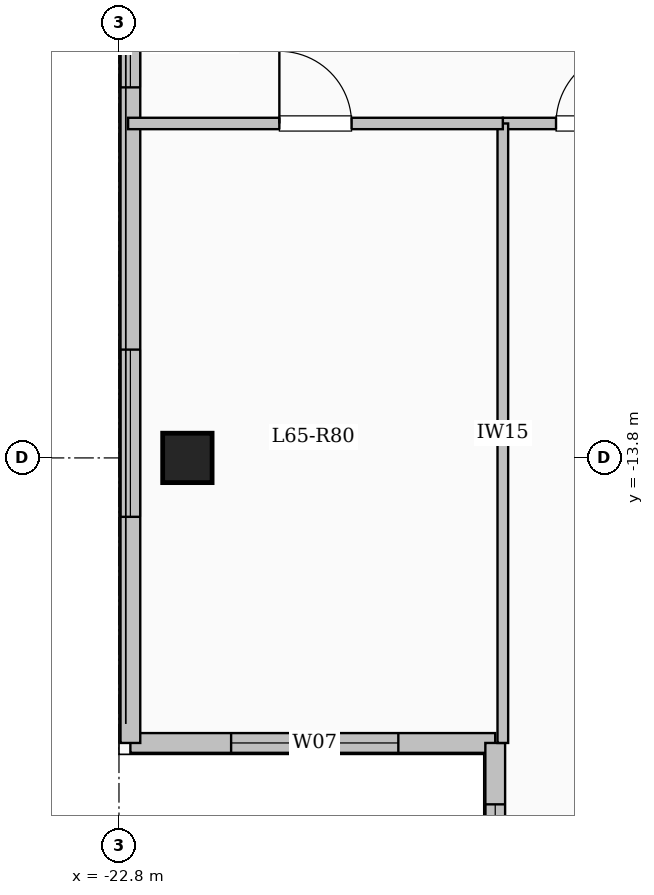
"""IFC4 building model, lengths in metres.
Left out: names, types, materials, properties, quantities, classifications, styles, units other than length and angle.
Written with IfcOpenShell. Run it as: python <this file> out.ifc"""

import sys

from ifc_helpers import new_model, si_unit, direction, frame, frame_2d, origin, origin_2d, place, context, subcontext, project, spatial, rectangle, extrude, element, fill, save


model = new_model("IFC4")
c1 = context("Model", 3, precision=1e-05, world=origin(), true_north=direction((0.0, 1.0)))
c2 = subcontext(c1, "Body", "Model", "MODEL_VIEW")
j1 = project(units=[si_unit("LENGTHUNIT", "METRE"), si_unit("PLANEANGLEUNIT", "RADIAN")], contexts=[c1])
p1 = place(None, origin())
s1 = spatial("IfcSite", under=j1, at=p1, CompositionType="ELEMENT")
p2 = place(p1, origin())
s2 = spatial("IfcBuilding", under=s1, at=p2, CompositionType="ELEMENT")
p3 = place(p2, frame((0.0, 0.0, 241.5)))
s3 = spatial("IfcBuildingStorey", under=s2, at=p3, CompositionType="ELEMENT", Elevation=241.5)
p4 = place(p3, frame((-21.9, -13.8, 0.0), z_axis=(0.0, 0.0, 1.0), x_axis=(1.0, 0.0, 0.0)))
e1 = element("IfcColumn", 1, at=p4, inside=s3, PredefinedType="COLUMN", context=c2, shape_type="SweptSolid", body=[
    extrude(rectangle(XDim=0.65, YDim=0.65, at=origin_2d()), origin(), (0.0, 0.0, 1.0), 3.35),
])
p5 = place(p3, frame((-17.85, -17.55, 0.0), z_axis=(0.0, 0.0, 1.0), x_axis=(-1.0, 0.0, 0.0)))
e2 = element("IfcWall", 2, at=p5, inside=s3, PredefinedType="SOLIDWALL", context=c2, shape_type="SweptSolid", body=[
    extrude(rectangle(XDim=4.8, YDim=0.26, at=frame_2d((2.4, 0.0))), origin(), (0.0, 0.0, 1.0), 3.1),
])
p6 = place(p5, frame((1.275, 0.0, 0.9)))
e3 = element("IfcOpeningElement", 3, at=p6, cuts=e2, PredefinedType="OPENING", context=c2, shape_type="SweptSolid", body=[
    extrude(rectangle(XDim=2.2, YDim=1.75, at=frame_2d((1.1, 0.875))), frame((0.0, 0.14, 0.0), z_axis=(0.0, -1.0, 0.0), x_axis=(1.0, 0.0, 0.0)), (0.0, 0.0, 1.0), 0.28),
])
p7 = place(p3, frame((-22.65, -17.55, 0.0), z_axis=(0.0, 0.0, 1.0), x_axis=(0.0, 1.0, 0.0)))
e4 = element("IfcWall", 4, at=p7, inside=s3, PredefinedType="SOLIDWALL", context=c2, shape_type="SweptSolid", body=[
    extrude(rectangle(XDim=35.1, YDim=0.26, at=frame_2d((17.55, 0.0))), origin(), (0.0, 0.0, 1.0), 3.1),
])
p8 = place(p7, frame((2.975, 0.0, 0.9)))
e5 = element("IfcOpeningElement", 5, at=p8, cuts=e4, PredefinedType="OPENING", context=c2, shape_type="SweptSolid", body=[
    extrude(rectangle(XDim=2.2, YDim=1.75, at=frame_2d((1.1, 0.875))), frame((0.0, 0.14, 0.0), z_axis=(0.0, -1.0, 0.0), x_axis=(1.0, 0.0, 0.0)), (0.0, 0.0, 1.0), 0.28),
])
p9 = place(p7, frame((8.625, 0.0, 0.95)))
e6 = element("IfcOpeningElement", 6, at=p9, cuts=e4, PredefinedType="OPENING", context=c2, shape_type="SweptSolid", body=[
    extrude(rectangle(XDim=1.2, YDim=1.5, at=frame_2d((0.6, 0.75))), frame((0.0, 0.14, 0.0), z_axis=(0.0, -1.0, 0.0), x_axis=(1.0, 0.0, 0.0)), (0.0, 0.0, 1.0), 0.28),
])
p10 = place(p7, frame((13.55, 0.0, 0.9)))
e7 = element("IfcOpeningElement", 7, at=p10, cuts=e4, PredefinedType="OPENING", context=c2, shape_type="SweptSolid", body=[
    extrude(rectangle(XDim=2.2, YDim=1.75, at=frame_2d((1.1, 0.875))), frame((0.0, 0.14, 0.0), z_axis=(0.0, -1.0, 0.0), x_axis=(1.0, 0.0, 0.0)), (0.0, 0.0, 1.0), 0.28),
])
p11 = place(p7, frame((19.95, 0.0, 0.9)))
e8 = element("IfcOpeningElement", 8, at=p11, cuts=e4, PredefinedType="OPENING", context=c2, shape_type="SweptSolid", body=[
    extrude(rectangle(XDim=1.65, YDim=1.6, at=frame_2d((0.825, 0.8))), frame((0.0, 0.14, 0.0), z_axis=(0.0, -1.0, 0.0), x_axis=(1.0, 0.0, 0.0)), (0.0, 0.0, 1.0), 0.28),
])
p12 = place(p7, frame((24.425, 0.0, 0.9)))
e9 = element("IfcOpeningElement", 9, at=p12, cuts=e4, PredefinedType="OPENING", context=c2, shape_type="SweptSolid", body=[
    extrude(rectangle(XDim=2.0, YDim=1.7, at=frame_2d((1.0, 0.85))), frame((0.0, 0.14, 0.0), z_axis=(0.0, -1.0, 0.0), x_axis=(1.0, 0.0, 0.0)), (0.0, 0.0, 1.0), 0.28),
])
p13 = place(p7, frame((28.675, 0.0, 0.95)))
e10 = element("IfcOpeningElement", 10, at=p13, cuts=e4, PredefinedType="OPENING", context=c2, shape_type="SweptSolid", body=[
    extrude(rectangle(XDim=1.0, YDim=1.5, at=frame_2d((0.5, 0.75))), frame((0.0, 0.14, 0.0), z_axis=(0.0, -1.0, 0.0), x_axis=(1.0, 0.0, 0.0)), (0.0, 0.0, 1.0), 0.28),
])
p14 = place(p7, frame((31.6, 0.0, 0.9)))
e11 = element("IfcOpeningElement", 11, at=p14, cuts=e4, PredefinedType="OPENING", context=c2, shape_type="SweptSolid", body=[
    extrude(rectangle(XDim=2.0, YDim=1.7, at=frame_2d((1.0, 0.85))), frame((0.0, 0.14, 0.0), z_axis=(0.0, -1.0, 0.0), x_axis=(1.0, 0.0, 0.0)), (0.0, 0.0, 1.0), 0.28),
])
p15 = place(p3, frame((-17.85, -20.85, 0.0), z_axis=(0.0, 0.0, 1.0), x_axis=(0.0, 1.0, 0.0)))
e12 = element("IfcWall", 12, at=p15, inside=s3, PredefinedType="SOLIDWALL", context=c2, shape_type="SweptSolid", body=[
    extrude(rectangle(XDim=3.3, YDim=0.26, at=frame_2d((1.65, 0.0))), origin(), (0.0, 0.0, 1.0), 3.1),
])
p16 = place(p15, frame((0.843, 0.0, 0.9)))
e13 = element("IfcOpeningElement", 13, at=p16, cuts=e12, PredefinedType="OPENING", context=c2, shape_type="SweptSolid", body=[
    extrude(rectangle(XDim=1.65, YDim=1.6, at=frame_2d((0.825, 0.8))), frame((0.0, 0.14, 0.0), z_axis=(0.0, -1.0, 0.0), x_axis=(1.0, 0.0, 0.0)), (0.0, 0.0, 1.0), 0.28),
])
p17 = place(p3, frame((-17.75, -9.4, 0.0), z_axis=(0.0, 0.0, 1.0), x_axis=(1.0, 0.0, 0.0)))
e14 = element("IfcWall", 14, at=p17, inside=s3, PredefinedType="PARTITIONING", context=c2, shape_type="SweptSolid", body=[
    extrude(rectangle(XDim=9.2, YDim=0.15, at=frame_2d((4.6, 0.0))), origin(), (0.0, 0.0, 1.0), 3.1),
])
p18 = place(p17, frame((0.7, 0.0, 0.0)))
e15 = element("IfcOpeningElement", 15, at=p18, cuts=e14, PredefinedType="OPENING", context=c2, shape_type="SweptSolid", body=[
    extrude(rectangle(XDim=0.96, YDim=2.15, at=frame_2d((0.48, 1.075))), frame((0.0, 0.085, 0.0), z_axis=(0.0, -1.0, 0.0), x_axis=(1.0, 0.0, 0.0)), (0.0, 0.0, 1.0), 0.17),
])
p19 = place(p3, frame((-17.75, -17.55, 0.0), z_axis=(0.0, 0.0, 1.0), x_axis=(0.0, 1.0, 0.0)))
e16 = element("IfcWall", 16, at=p19, inside=s3, PredefinedType="PARTITIONING", context=c2, shape_type="SweptSolid", body=[
    extrude(rectangle(XDim=8.15, YDim=0.14, at=frame_2d((4.075, 0.0))), origin(), (0.0, 0.0, 1.0), 3.1),
])
p20 = place(p3, frame((-22.68, -9.4, 0.0), z_axis=(0.0, 0.0, 1.0), x_axis=(1.0, 0.0, 0.0)))
e17 = element("IfcWall", 17, at=p20, inside=s3, PredefinedType="PARTITIONING", context=c2, shape_type="SweptSolid", body=[
    extrude(rectangle(XDim=4.93, YDim=0.15, at=frame_2d((2.465, 0.0))), origin(), (0.0, 0.0, 1.0), 3.1),
])
p21 = place(p20, frame((1.99, 0.0, 0.0)))
e18 = element("IfcOpeningElement", 18, at=p21, cuts=e17, PredefinedType="OPENING", context=c2, shape_type="SweptSolid", body=[
    extrude(rectangle(XDim=0.95, YDim=2.15, at=frame_2d((0.475, 1.075))), frame((0.0, 0.085, 0.0), z_axis=(0.0, -1.0, 0.0), x_axis=(1.0, 0.0, 0.0)), (0.0, 0.0, 1.0), 0.17),
])
p22 = place(p6, origin())
e19 = element("IfcWindow", 19, at=p22, inside=s3, PartitioningType="SINGLE_PANEL", PredefinedType="WINDOW", context=c2, shape_type="SweptSolid", body=[
    extrude(rectangle(XDim=2.2, YDim=1.75, at=frame_2d((1.1, 0.875))), frame((0.0, 0.03, 0.0), z_axis=(0.0, -1.0, 0.0), x_axis=(1.0, 0.0, 0.0)), (0.0, 0.0, 1.0), 0.06),
])
fill(e3, e19)
p23 = place(p8, origin())
e20 = element("IfcWindow", 20, at=p23, inside=s3, PartitioningType="SINGLE_PANEL", PredefinedType="WINDOW", context=c2, shape_type="SweptSolid", body=[
    extrude(rectangle(XDim=2.2, YDim=1.75, at=frame_2d((1.1, 0.875))), frame((0.0, 0.03, 0.0), z_axis=(0.0, -1.0, 0.0), x_axis=(1.0, 0.0, 0.0)), (0.0, 0.0, 1.0), 0.06),
])
fill(e5, e20)
p24 = place(p9, origin())
e21 = element("IfcWindow", 21, at=p24, inside=s3, PartitioningType="SINGLE_PANEL", PredefinedType="WINDOW", context=c2, shape_type="SweptSolid", body=[
    extrude(rectangle(XDim=1.2, YDim=1.5, at=frame_2d((0.6, 0.75))), frame((0.0, 0.03, 0.0), z_axis=(0.0, -1.0, 0.0), x_axis=(1.0, 0.0, 0.0)), (0.0, 0.0, 1.0), 0.06),
])
fill(e6, e21)
p25 = place(p16, origin())
e22 = element("IfcWindow", 22, at=p25, inside=s3, PartitioningType="SINGLE_PANEL", PredefinedType="WINDOW", context=c2, shape_type="SweptSolid", body=[
    extrude(rectangle(XDim=1.65, YDim=1.6, at=frame_2d((0.825, 0.8))), frame((0.0, 0.03, 0.0), z_axis=(0.0, -1.0, 0.0), x_axis=(1.0, 0.0, 0.0)), (0.0, 0.0, 1.0), 0.06),
])
fill(e13, e22)
p26 = place(p18, origin())
e23 = element("IfcDoor", 23, at=p26, inside=s3, OperationType="SINGLE_SWING_RIGHT", PredefinedType="DOOR", context=c2, shape_type="SweptSolid", body=[
    extrude(rectangle(XDim=0.96, YDim=2.15, at=frame_2d((0.48, 1.075))), frame((0.0, 0.025, 0.0), z_axis=(0.0, -1.0, 0.0), x_axis=(1.0, 0.0, 0.0)), (0.0, 0.0, 1.0), 0.05),
])
fill(e15, e23)
p27 = place(p21, origin())
e24 = element("IfcDoor", 24, at=p27, inside=s3, OperationType="SINGLE_SWING_LEFT", PredefinedType="DOOR", context=c2, shape_type="SweptSolid", body=[
    extrude(rectangle(XDim=0.95, YDim=2.15, at=frame_2d((0.475, 1.075))), frame((0.0, 0.025, 0.0), z_axis=(0.0, -1.0, 0.0), x_axis=(1.0, 0.0, 0.0)), (0.0, 0.0, 1.0), 0.05),
])
fill(e18, e24)
save(model, sys.argv[1])
